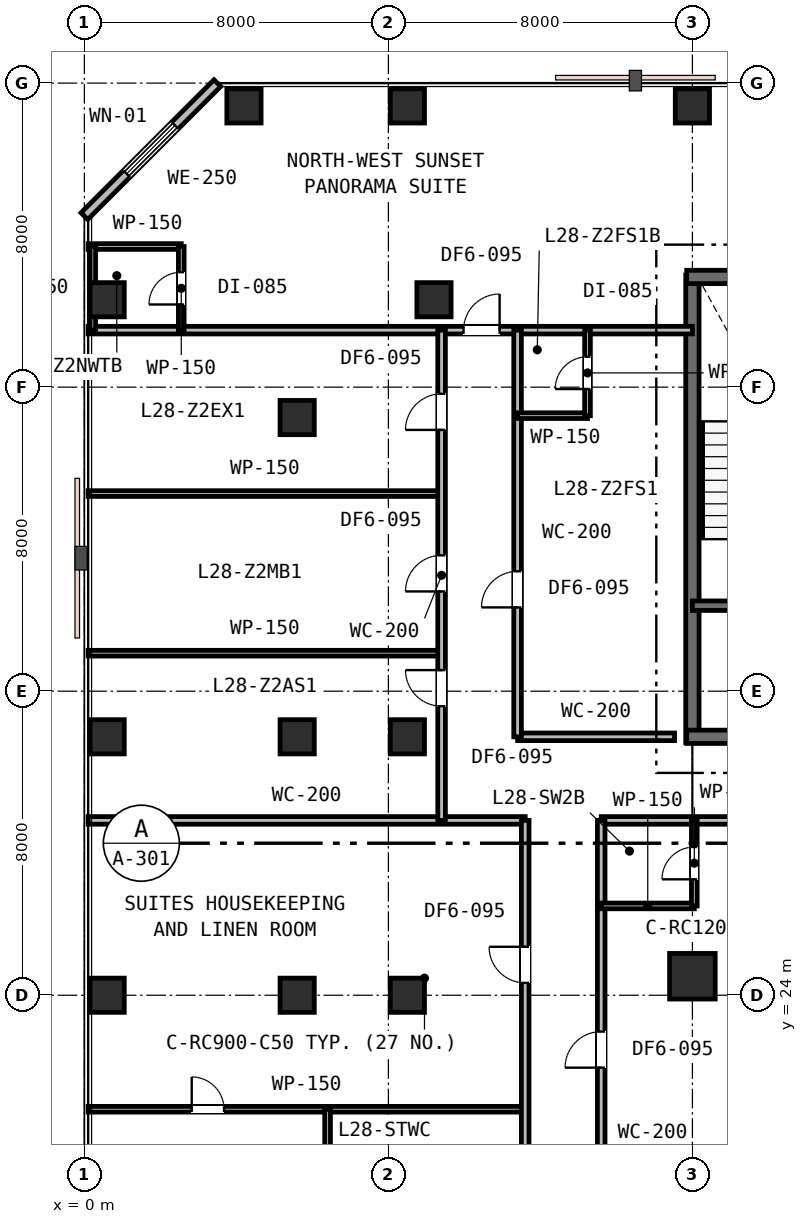
"""IFC4 building model, lengths in metres.
Left out: names, types, materials, properties, quantities, classifications, styles, units other than length and angle.
Written with IfcOpenShell. Run it as: python <this file> out.ifc"""

import sys

from ifc_helpers import new_model, si_unit, direction, frame, frame_2d, origin, origin_2d, place, context, subcontext, project, spatial, rectangle, extrude, element, fill, save


model = new_model("IFC4")
c1 = context("Model", 3, precision=1e-05, world=origin(), true_north=direction((0.0, 1.0)))
c2 = subcontext(c1, "Body", "Model", "MODEL_VIEW")
j1 = project(units=[si_unit("LENGTHUNIT", "METRE"), si_unit("PLANEANGLEUNIT", "RADIAN")], contexts=[c1])
p1 = place(None, origin())
s1 = spatial("IfcSite", under=j1, at=p1, CompositionType="ELEMENT")
p2 = place(p1, origin())
s2 = spatial("IfcBuilding", under=s1, at=p2, CompositionType="ELEMENT")
p3 = place(p2, frame((0.0, 0.0, 111.6)))
s3 = spatial("IfcBuildingStorey", under=s2, at=p3, CompositionType="ELEMENT", Elevation=111.6)
p4 = place(p3, frame((16.0, 30.65, 0.0), z_axis=(0.0, 0.0, 1.0), x_axis=(0.0, 1.0, 0.0)))
e1 = element("IfcWall", 1, at=p4, inside=s3, PredefinedType="SHEAR", context=c2, shape_type="SweptSolid", body=[
    extrude(rectangle(XDim=12.3, YDim=0.35, at=frame_2d((6.15, 0.0))), origin(), (0.0, 0.0, 1.0), 3.6),
])
p5 = place(p3, frame((15.85, 42.9, 0.0), z_axis=(0.0, 0.0, 1.0), x_axis=(1.0, 0.0, 0.0)))
e2 = element("IfcWall", 2, at=p5, inside=s3, PredefinedType="SHEAR", context=c2, shape_type="SweptSolid", body=[
    extrude(rectangle(XDim=24.3, YDim=0.35, at=frame_2d((12.15, 0.0))), origin(), (0.0, 0.0, 1.0), 3.6),
])
p6 = place(p3, frame((15.85, 30.8, 0.0), z_axis=(0.0, 0.0, 1.0), x_axis=(1.0, 0.0, 0.0)))
e3 = element("IfcWall", 3, at=p6, inside=s3, PredefinedType="SHEAR", context=c2, shape_type="SweptSolid", body=[
    extrude(rectangle(XDim=11.2, YDim=0.35, at=frame_2d((5.6, 0.0))), origin(), (0.0, 0.0, 1.0), 3.6),
])
p7 = place(p6, frame((2.45, 0.0, 0.0)))
e4 = element("IfcOpeningElement", 4, at=p7, cuts=e3, PredefinedType="OPENING", context=c2, shape_type="SweptSolid", body=[
    extrude(rectangle(XDim=1.1, YDim=2.15, at=frame_2d((0.55, 1.075))), frame((0.0, 0.185, 0.0), z_axis=(0.0, -1.0, 0.0), x_axis=(1.0, 0.0, 0.0)), (0.0, 0.0, 1.0), 0.37),
])
p8 = place(p3, frame((16.0, 34.25, 0.0), z_axis=(0.0, 0.0, 1.0), x_axis=(1.0, 0.0, 0.0)))
e5 = element("IfcWall", 5, at=p8, inside=s3, PredefinedType="SHEAR", context=c2, shape_type="SweptSolid", body=[
    extrude(rectangle(XDim=6.05, YDim=0.25, at=frame_2d((3.025, 0.0))), origin(), (0.0, 0.0, 1.0), 3.6),
])
p9 = place(p8, frame((1.25, 0.0, 0.0)))
e6 = element("IfcOpeningElement", 6, at=p9, cuts=e5, PredefinedType="OPENING", context=c2, shape_type="SweptSolid", body=[
    extrude(rectangle(XDim=1.0, YDim=2.15, at=frame_2d((0.5, 1.075))), frame((0.0, 0.135, 0.0), z_axis=(0.0, -1.0, 0.0), x_axis=(1.0, 0.0, 0.0)), (0.0, 0.0, 1.0), 0.27),
])
p10 = place(p8, frame((4.2, 0.0, 0.0)))
e7 = element("IfcOpeningElement", 7, at=p10, cuts=e5, PredefinedType="OPENING", context=c2, shape_type="SweptSolid", body=[
    extrude(rectangle(XDim=1.1, YDim=2.15, at=frame_2d((0.55, 1.075))), frame((0.0, 0.135, 0.0), z_axis=(0.0, -1.0, 0.0), x_axis=(1.0, 0.0, 0.0)), (0.0, 0.0, 1.0), 0.27),
])
p11 = place(p3, frame((8.5, 24.0, 0.0), z_axis=(0.0, 0.0, 1.0), x_axis=(1.0, 0.0, 0.0)))
e8 = element("IfcColumn", 8, at=p11, inside=s3, PredefinedType="COLUMN", context=c2, shape_type="SweptSolid", body=[
    extrude(rectangle(XDim=0.9, YDim=0.9, at=origin_2d()), origin(), (0.0, 0.0, 1.0), 3.6),
])
p12 = place(p3, frame((16.0, 24.5, 0.0), z_axis=(0.0, 0.0, 1.0), x_axis=(1.0, 0.0, 0.0)))
e9 = element("IfcColumn", 9, at=p12, inside=s3, PredefinedType="COLUMN", context=c2, shape_type="SweptSolid", body=[
    extrude(rectangle(XDim=1.2, YDim=1.2, at=origin_2d()), origin(), (0.0, 0.0, 1.0), 3.6),
])
for number, where, z_axis, x_axis in (
    (10, (5.6, 24.0, 0.0), (0.0, 0.0, 1.0), (1.0, 0.0, 0.0)),
    (11, (5.6, 30.8, 0.0), (0.0, 0.0, 1.0), (1.0, 0.0, 0.0)),
    (12, (5.6, 39.2, 0.0), (0.0, 0.0, 1.0), (1.0, 0.0, 0.0)),
    (13, (8.5, 30.8, 0.0), (0.0, 0.0, 1.0), (1.0, 0.0, 0.0)),
    (14, (9.2, 42.3, 0.0), (0.0, 0.0, 1.0), (1.0, 0.0, 0.0)),
    (15, (0.6, 24.0, 0.0), (0.0, 0.0, 1.0), (1.0, 0.0, 0.0)),
    (16, (0.6, 30.8, 0.0), (0.0, 0.0, 1.0), (1.0, 0.0, 0.0)),
    (17, (0.6, 42.3, 0.0), (0.0, 0.0, 1.0), (1.0, 0.0, 0.0)),
    (18, (4.2, 47.4, 0.0), (0.0, 0.0, 1.0), (1.0, 0.0, 0.0)),
    (19, (8.5, 47.4, 0.0), (0.0, 0.0, 1.0), (1.0, 0.0, 0.0)),
    (20, (16.0, 47.4, 0.0), (0.0, 0.0, 1.0), (1.0, 0.0, 0.0)),
):
    element("IfcColumn", number, at=place(p3, frame(where, z_axis=z_axis, x_axis=x_axis)), inside=s3, PredefinedType="COLUMN", context=c2, shape_type="SweptSolid", body=[
        extrude(rectangle(XDim=0.9, YDim=0.9, at=origin_2d()), origin(), (0.0, 0.0, 1.0), 3.6),
    ])
p13 = place(p3, frame((3.5, 48.0, 0.0), z_axis=(0.0, 0.0, 1.0), x_axis=(-0.707106781187, -0.707106781187, 0.0)))
e21 = element("IfcWall", 21, at=p13, inside=s3, PredefinedType="STANDARD", context=c2, shape_type="SweptSolid", body=[
    extrude(rectangle(XDim=4.95, YDim=0.25, at=frame_2d((2.475, 0.0))), origin(), (0.0, 0.0, 1.0), 3.33),
])
p14 = place(p13, frame((1.575, 0.0, 0.75)))
e22 = element("IfcOpeningElement", 22, at=p14, cuts=e21, PredefinedType="OPENING", context=c2, shape_type="SweptSolid", body=[
    extrude(rectangle(XDim=1.8, YDim=1.85, at=frame_2d((0.9, 0.925))), frame((0.0, 0.135, 0.0), z_axis=(0.0, -1.0, 0.0), x_axis=(1.0, 0.0, 0.0)), (0.0, 0.0, 1.0), 0.27),
])
p15 = place(p3, frame((0.1, 28.6, 0.0), z_axis=(0.0, 0.0, 1.0), x_axis=(1.0, 0.0, 0.0)))
e23 = element("IfcWall", 23, at=p15, inside=s3, PredefinedType="PARTITIONING", context=c2, shape_type="SweptSolid", body=[
    extrude(rectangle(XDim=11.5, YDim=0.2, at=frame_2d((5.75, 0.0))), origin(), (0.0, 0.0, 1.0), 2.87),
])
p16 = place(p3, frame((13.6, 28.6, 0.0), z_axis=(0.0, 0.0, 1.0), x_axis=(1.0, 0.0, 0.0)))
e24 = element("IfcWall", 24, at=p16, inside=s3, PredefinedType="PARTITIONING", context=c2, shape_type="SweptSolid", body=[
    extrude(rectangle(XDim=30.6, YDim=0.2, at=frame_2d((15.3, 0.0))), origin(), (0.0, 0.0, 1.0), 2.87),
])
p17 = place(p16, frame((13.325, 0.0, 0.0)))
e25 = element("IfcOpeningElement", 25, at=p17, cuts=e24, PredefinedType="OPENING", context=c2, shape_type="SweptSolid", body=[
    extrude(rectangle(XDim=0.95, YDim=2.15, at=frame_2d((0.475, 1.075))), frame((0.0, 0.11, 0.0), z_axis=(0.0, -1.0, 0.0), x_axis=(1.0, 0.0, 0.0)), (0.0, 0.0, 1.0), 0.22),
])
p18 = place(p16, frame((18.761, 0.0, 0.0)))
e26 = element("IfcOpeningElement", 26, at=p18, cuts=e24, PredefinedType="OPENING", context=c2, shape_type="SweptSolid", body=[
    extrude(rectangle(XDim=0.95, YDim=2.15, at=frame_2d((0.475, 1.075))), frame((0.0, 0.11, 0.0), z_axis=(0.0, -1.0, 0.0), x_axis=(1.0, 0.0, 0.0)), (0.0, 0.0, 1.0), 0.22),
])
p19 = place(p16, frame((25.503, 0.0, 0.0)))
e27 = element("IfcOpeningElement", 27, at=p19, cuts=e24, PredefinedType="OPENING", context=c2, shape_type="SweptSolid", body=[
    extrude(rectangle(XDim=0.95, YDim=2.15, at=frame_2d((0.475, 1.075))), frame((0.0, 0.11, 0.0), z_axis=(0.0, -1.0, 0.0), x_axis=(1.0, 0.0, 0.0)), (0.0, 0.0, 1.0), 0.22),
])
p20 = place(p3, frame((11.4, 30.8, 0.0), z_axis=(0.0, 0.0, 1.0), x_axis=(1.0, 0.0, 0.0)))
e28 = element("IfcWall", 28, at=p20, inside=s3, PredefinedType="PARTITIONING", context=c2, shape_type="SweptSolid", body=[
    extrude(rectangle(XDim=4.13, YDim=0.2, at=frame_2d((2.065, 0.0))), origin(), (0.0, 0.0, 1.0), 2.87),
])
p21 = place(p3, frame((0.1, 21.0, 0.0), z_axis=(0.0, 0.0, 1.0), x_axis=(1.0, 0.0, 0.0)))
e29 = element("IfcWall", 29, at=p21, inside=s3, PredefinedType="PARTITIONING", context=c2, shape_type="SweptSolid", body=[
    extrude(rectangle(XDim=11.5, YDim=0.15, at=frame_2d((5.75, 0.0))), origin(), (0.0, 0.0, 1.0), 2.87),
])
p22 = place(p21, frame((2.725, 0.0, 0.0)))
e30 = element("IfcOpeningElement", 30, at=p22, cuts=e29, PredefinedType="OPENING", context=c2, shape_type="SweptSolid", body=[
    extrude(rectangle(XDim=0.85, YDim=2.15, at=frame_2d((0.425, 1.075))), frame((0.0, 0.085, 0.0), z_axis=(0.0, -1.0, 0.0), x_axis=(1.0, 0.0, 0.0)), (0.0, 0.0, 1.0), 0.17),
])
p23 = place(p3, frame((6.4, 18.0, 0.0), z_axis=(0.0, 0.0, 1.0), x_axis=(0.0, 1.0, 0.0)))
e31 = element("IfcWall", 31, at=p23, inside=s3, PredefinedType="PARTITIONING", context=c2, shape_type="SweptSolid", body=[
    extrude(rectangle(XDim=3.0, YDim=0.15, at=frame_2d((1.5, 0.0))), origin(), (0.0, 0.0, 1.0), 2.87),
])
p24 = place(p3, frame((11.6, 10.6, 0.0), z_axis=(0.0, 0.0, 1.0), x_axis=(0.0, 1.0, 0.0)))
e32 = element("IfcWall", 32, at=p24, inside=s3, PredefinedType="PARTITIONING", context=c2, shape_type="SweptSolid", body=[
    extrude(rectangle(XDim=18.0, YDim=0.2, at=frame_2d((9.0, 0.0))), origin(), (0.0, 0.0, 1.0), 2.87),
])
p25 = place(p24, frame((8.425, 0.0, 0.0)))
e33 = element("IfcOpeningElement", 33, at=p25, cuts=e32, PredefinedType="OPENING", context=c2, shape_type="SweptSolid", body=[
    extrude(rectangle(XDim=0.95, YDim=2.15, at=frame_2d((0.475, 1.075))), frame((0.0, 0.11, 0.0), z_axis=(0.0, -1.0, 0.0), x_axis=(1.0, 0.0, 0.0)), (0.0, 0.0, 1.0), 0.22),
])
p26 = place(p24, frame((13.725, 0.0, 0.0)))
e34 = element("IfcOpeningElement", 34, at=p26, cuts=e32, PredefinedType="OPENING", context=c2, shape_type="SweptSolid", body=[
    extrude(rectangle(XDim=0.95, YDim=2.15, at=frame_2d((0.475, 1.075))), frame((0.0, 0.11, 0.0), z_axis=(0.0, -1.0, 0.0), x_axis=(1.0, 0.0, 0.0)), (0.0, 0.0, 1.0), 0.22),
])
p27 = place(p24, frame((3.225, 0.0, 0.0)))
e35 = element("IfcOpeningElement", 35, at=p27, cuts=e32, PredefinedType="OPENING", context=c2, shape_type="SweptSolid", body=[
    extrude(rectangle(XDim=0.95, YDim=2.15, at=frame_2d((0.475, 1.075))), frame((0.0, 0.11, 0.0), z_axis=(0.0, -1.0, 0.0), x_axis=(1.0, 0.0, 0.0)), (0.0, 0.0, 1.0), 0.22),
])
p28 = place(p3, frame((0.1, 41.5, 0.0), z_axis=(0.0, 0.0, 1.0), x_axis=(1.0, 0.0, 0.0)))
e36 = element("IfcWall", 36, at=p28, inside=s3, PredefinedType="PARTITIONING", context=c2, shape_type="SweptSolid", body=[
    extrude(rectangle(XDim=15.9, YDim=0.2, at=frame_2d((7.95, 0.0))), origin(), (0.0, 0.0, 1.0), 2.87),
])
p29 = place(p28, frame((9.877, 0.0, 0.0)))
e37 = element("IfcOpeningElement", 37, at=p29, cuts=e36, PredefinedType="OPENING", context=c2, shape_type="SweptSolid", body=[
    extrude(rectangle(XDim=0.95, YDim=2.15, at=frame_2d((0.475, 1.075))), frame((0.0, 0.11, 0.0), z_axis=(0.0, -1.0, 0.0), x_axis=(1.0, 0.0, 0.0)), (0.0, 0.0, 1.0), 0.22),
])
p30 = place(p3, frame((0.1, 43.7, 0.0), z_axis=(0.0, 0.0, 1.0), x_axis=(1.0, 0.0, 0.0)))
e38 = element("IfcWall", 38, at=p30, inside=s3, PredefinedType="PARTITIONING", context=c2, shape_type="SweptSolid", body=[
    extrude(rectangle(XDim=2.45, YDim=0.15, at=frame_2d((1.225, 0.0))), origin(), (0.0, 0.0, 1.0), 3.33),
])
p31 = place(p3, frame((2.55, 41.5, 0.0), z_axis=(0.0, 0.0, 1.0), x_axis=(0.0, 1.0, 0.0)))
e39 = element("IfcWall", 39, at=p31, inside=s3, PredefinedType="PARTITIONING", context=c2, shape_type="SweptSolid", body=[
    extrude(rectangle(XDim=2.2, YDim=0.15, at=frame_2d((1.1, 0.0))), origin(), (0.0, 0.0, 1.0), 2.87),
])
p32 = place(p31, frame((0.675, 0.0, 0.0)))
e40 = element("IfcOpeningElement", 40, at=p32, cuts=e39, PredefinedType="OPENING", context=c2, shape_type="SweptSolid", body=[
    extrude(rectangle(XDim=0.85, YDim=2.15, at=frame_2d((0.425, 1.075))), frame((0.0, 0.085, 0.0), z_axis=(0.0, -1.0, 0.0), x_axis=(1.0, 0.0, 0.0)), (0.0, 0.0, 1.0), 0.17),
])
p33 = place(p3, frame((0.22, 41.5, 0.0), z_axis=(0.0, 0.0, 1.0), x_axis=(0.0, 1.0, 0.0)))
e41 = element("IfcWall", 41, at=p33, inside=s3, PredefinedType="PARTITIONING", context=c2, shape_type="SweptSolid", body=[
    extrude(rectangle(XDim=2.2, YDim=0.15, at=frame_2d((1.1, 0.0))), origin(), (0.0, 0.0, 1.0), 2.87),
])
for number, where, z_axis, x_axis in (
    (42, (0.1, 33.0, 0.0), (0.0, 0.0, 1.0), (1.0, 0.0, 0.0)),
    (43, (0.1, 37.2, 0.0), (0.0, 0.0, 1.0), (1.0, 0.0, 0.0)),
):
    element("IfcWall", number, at=place(p3, frame(where, z_axis=z_axis, x_axis=x_axis)), inside=s3, PredefinedType="PARTITIONING", context=c2, shape_type="SweptSolid", body=[
        extrude(rectangle(XDim=9.3, YDim=0.15, at=frame_2d((4.65, 0.0))), origin(), (0.0, 0.0, 1.0), 2.87),
    ])
p34 = place(p3, frame((9.4, 28.6, 0.0), z_axis=(0.0, 0.0, 1.0), x_axis=(0.0, 1.0, 0.0)))
e44 = element("IfcWall", 44, at=p34, inside=s3, PredefinedType="PARTITIONING", context=c2, shape_type="SweptSolid", body=[
    extrude(rectangle(XDim=12.9, YDim=0.2, at=frame_2d((6.45, 0.0))), origin(), (0.0, 0.0, 1.0), 2.87),
])
p35 = place(p34, frame((3.005, 0.0, 0.0)))
e45 = element("IfcOpeningElement", 45, at=p35, cuts=e44, PredefinedType="OPENING", context=c2, shape_type="SweptSolid", body=[
    extrude(rectangle(XDim=0.95, YDim=2.15, at=frame_2d((0.475, 1.075))), frame((0.0, 0.11, 0.0), z_axis=(0.0, -1.0, 0.0), x_axis=(1.0, 0.0, 0.0)), (0.0, 0.0, 1.0), 0.22),
])
p36 = place(p34, frame((6.025, 0.0, 0.0)))
e46 = element("IfcOpeningElement", 46, at=p36, cuts=e44, PredefinedType="OPENING", context=c2, shape_type="SweptSolid", body=[
    extrude(rectangle(XDim=0.95, YDim=2.15, at=frame_2d((0.475, 1.075))), frame((0.0, 0.11, 0.0), z_axis=(0.0, -1.0, 0.0), x_axis=(1.0, 0.0, 0.0)), (0.0, 0.0, 1.0), 0.22),
])
p37 = place(p34, frame((10.275, 0.0, 0.0)))
e47 = element("IfcOpeningElement", 47, at=p37, cuts=e44, PredefinedType="OPENING", context=c2, shape_type="SweptSolid", body=[
    extrude(rectangle(XDim=0.95, YDim=2.15, at=frame_2d((0.475, 1.075))), frame((0.0, 0.11, 0.0), z_axis=(0.0, -1.0, 0.0), x_axis=(1.0, 0.0, 0.0)), (0.0, 0.0, 1.0), 0.22),
])
p38 = place(p3, frame((11.4, 30.8, 0.0), z_axis=(0.0, 0.0, 1.0), x_axis=(0.0, 1.0, 0.0)))
e48 = element("IfcWall", 48, at=p38, inside=s3, PredefinedType="PARTITIONING", context=c2, shape_type="SweptSolid", body=[
    extrude(rectangle(XDim=10.7, YDim=0.2, at=frame_2d((5.35, 0.0))), origin(), (0.0, 0.0, 1.0), 2.87),
])
p39 = place(p38, frame((3.405, 0.0, 0.0)))
e49 = element("IfcOpeningElement", 49, at=p39, cuts=e48, PredefinedType="OPENING", context=c2, shape_type="SweptSolid", body=[
    extrude(rectangle(XDim=0.95, YDim=2.15, at=frame_2d((0.475, 1.075))), frame((0.0, 0.11, 0.0), z_axis=(0.0, -1.0, 0.0), x_axis=(1.0, 0.0, 0.0)), (0.0, 0.0, 1.0), 0.22),
])
p40 = place(p3, frame((11.4, 39.25, 0.0), z_axis=(0.0, 0.0, 1.0), x_axis=(1.0, 0.0, 0.0)))
e50 = element("IfcWall", 50, at=p40, inside=s3, PredefinedType="PARTITIONING", context=c2, shape_type="SweptSolid", body=[
    extrude(rectangle(XDim=1.84, YDim=0.15, at=frame_2d((0.92, 0.0))), origin(), (0.0, 0.0, 1.0), 3.33),
])
p41 = place(p3, frame((13.24, 39.25, 0.0), z_axis=(0.0, 0.0, 1.0), x_axis=(0.0, 1.0, 0.0)))
e51 = element("IfcWall", 51, at=p41, inside=s3, PredefinedType="PARTITIONING", context=c2, shape_type="SweptSolid", body=[
    extrude(rectangle(XDim=2.25, YDim=0.15, at=frame_2d((1.125, 0.0))), origin(), (0.0, 0.0, 1.0), 3.33),
])
p42 = place(p41, frame((0.7, 0.0, 0.0)))
e52 = element("IfcOpeningElement", 52, at=p42, cuts=e51, PredefinedType="OPENING", context=c2, shape_type="SweptSolid", body=[
    extrude(rectangle(XDim=0.85, YDim=2.15, at=frame_2d((0.425, 1.075))), frame((0.0, 0.085, 0.0), z_axis=(0.0, -1.0, 0.0), x_axis=(1.0, 0.0, 0.0)), (0.0, 0.0, 1.0), 0.17),
])
p43 = place(p3, frame((13.6, 10.6, 0.0), z_axis=(0.0, 0.0, 1.0), x_axis=(0.0, 1.0, 0.0)))
e53 = element("IfcWall", 53, at=p43, inside=s3, PredefinedType="PARTITIONING", context=c2, shape_type="SweptSolid", body=[
    extrude(rectangle(XDim=18.0, YDim=0.2, at=frame_2d((9.0, 0.0))), origin(), (0.0, 0.0, 1.0), 2.87),
])
p44 = place(p43, frame((4.24, 0.0, 0.0)))
e54 = element("IfcOpeningElement", 54, at=p44, cuts=e53, PredefinedType="OPENING", context=c2, shape_type="SweptSolid", body=[
    extrude(rectangle(XDim=0.95, YDim=2.15, at=frame_2d((0.475, 1.075))), frame((0.0, 0.11, 0.0), z_axis=(0.0, -1.0, 0.0), x_axis=(1.0, 0.0, 0.0)), (0.0, 0.0, 1.0), 0.22),
])
p45 = place(p43, frame((11.494, 0.0, 0.0)))
e55 = element("IfcOpeningElement", 55, at=p45, cuts=e53, PredefinedType="OPENING", context=c2, shape_type="SweptSolid", body=[
    extrude(rectangle(XDim=0.95, YDim=2.15, at=frame_2d((0.475, 1.075))), frame((0.0, 0.11, 0.0), z_axis=(0.0, -1.0, 0.0), x_axis=(1.0, 0.0, 0.0)), (0.0, 0.0, 1.0), 0.22),
])
p46 = place(p3, frame((13.6, 26.35, 0.0), z_axis=(0.0, 0.0, 1.0), x_axis=(1.0, 0.0, 0.0)))
e56 = element("IfcWall", 56, at=p46, inside=s3, PredefinedType="PARTITIONING", context=c2, shape_type="SweptSolid", body=[
    extrude(rectangle(XDim=2.45, YDim=0.15, at=frame_2d((1.225, 0.0))), origin(), (0.0, 0.0, 1.0), 2.87),
])
p47 = place(p3, frame((16.05, 26.35, 0.0), z_axis=(0.0, 0.0, 1.0), x_axis=(0.0, 1.0, 0.0)))
e57 = element("IfcWall", 57, at=p47, inside=s3, PredefinedType="PARTITIONING", context=c2, shape_type="SweptSolid", body=[
    extrude(rectangle(XDim=2.25, YDim=0.15, at=frame_2d((1.125, 0.0))), origin(), (0.0, 0.0, 1.0), 2.87),
])
p48 = place(p47, frame((0.7, 0.0, 0.0)))
e58 = element("IfcOpeningElement", 58, at=p48, cuts=e57, PredefinedType="OPENING", context=c2, shape_type="SweptSolid", body=[
    extrude(rectangle(XDim=0.85, YDim=2.15, at=frame_2d((0.425, 1.075))), frame((0.0, 0.085, 0.0), z_axis=(0.0, -1.0, 0.0), x_axis=(1.0, 0.0, 0.0)), (0.0, 0.0, 1.0), 0.17),
])
p49 = place(p14, origin())
e59 = element("IfcWindow", 59, at=p49, inside=s3, PartitioningType="SINGLE_PANEL", PredefinedType="WINDOW", context=c2, shape_type="SweptSolid", body=[
    extrude(rectangle(XDim=1.8, YDim=1.85, at=frame_2d((0.9, 0.925))), frame((0.0, 0.03, 0.0), z_axis=(0.0, -1.0, 0.0), x_axis=(1.0, 0.0, 0.0)), (0.0, 0.0, 1.0), 0.06),
])
fill(e22, e59)
p50 = place(p22, origin())
e60 = element("IfcDoor", 60, at=p50, inside=s3, OperationType="SINGLE_SWING_LEFT", PredefinedType="DOOR", context=c2, shape_type="SweptSolid", body=[
    extrude(rectangle(XDim=0.85, YDim=2.15, at=frame_2d((0.425, 1.075))), frame((0.0, 0.025, 0.0), z_axis=(0.0, -1.0, 0.0), x_axis=(1.0, 0.0, 0.0)), (0.0, 0.0, 1.0), 0.05),
])
fill(e30, e60)
p51 = place(p26, origin())
e61 = element("IfcDoor", 61, at=p51, inside=s3, OperationType="SINGLE_SWING_RIGHT", PredefinedType="DOOR", context=c2, shape_type="SweptSolid", body=[
    extrude(rectangle(XDim=0.95, YDim=2.15, at=frame_2d((0.475, 1.075))), frame((0.0, 0.025, 0.0), z_axis=(0.0, -1.0, 0.0), x_axis=(1.0, 0.0, 0.0)), (0.0, 0.0, 1.0), 0.05),
])
fill(e34, e61)
p52 = place(p29, origin())
e62 = element("IfcDoor", 62, at=p52, inside=s3, OperationType="SINGLE_SWING_RIGHT", PredefinedType="DOOR", context=c2, shape_type="SweptSolid", body=[
    extrude(rectangle(XDim=0.95, YDim=2.15, at=frame_2d((0.475, 1.075))), frame((0.0, 0.025, 0.0), z_axis=(0.0, -1.0, 0.0), x_axis=(1.0, 0.0, 0.0)), (0.0, 0.0, 1.0), 0.05),
])
fill(e37, e62)
p53 = place(p32, origin())
e63 = element("IfcDoor", 63, at=p53, inside=s3, OperationType="SINGLE_SWING_LEFT", PredefinedType="DOOR", context=c2, shape_type="SweptSolid", body=[
    extrude(rectangle(XDim=0.85, YDim=2.15, at=frame_2d((0.425, 1.075))), frame((0.0, 0.025, 0.0), z_axis=(0.0, -1.0, 0.0), x_axis=(1.0, 0.0, 0.0)), (0.0, 0.0, 1.0), 0.05),
])
fill(e40, e63)
p54 = place(p35, origin())
e64 = element("IfcDoor", 64, at=p54, inside=s3, OperationType="SINGLE_SWING_RIGHT", PredefinedType="DOOR", context=c2, shape_type="SweptSolid", body=[
    extrude(rectangle(XDim=0.95, YDim=2.15, at=frame_2d((0.475, 1.075))), frame((0.0, 0.025, 0.0), z_axis=(0.0, -1.0, 0.0), x_axis=(1.0, 0.0, 0.0)), (0.0, 0.0, 1.0), 0.05),
])
fill(e45, e64)
p55 = place(p36, origin())
e65 = element("IfcDoor", 65, at=p55, inside=s3, OperationType="SINGLE_SWING_LEFT", PredefinedType="DOOR", context=c2, shape_type="SweptSolid", body=[
    extrude(rectangle(XDim=0.95, YDim=2.15, at=frame_2d((0.475, 1.075))), frame((0.0, 0.025, 0.0), z_axis=(0.0, -1.0, 0.0), x_axis=(1.0, 0.0, 0.0)), (0.0, 0.0, 1.0), 0.05),
])
fill(e46, e65)
p56 = place(p37, origin())
e66 = element("IfcDoor", 66, at=p56, inside=s3, OperationType="SINGLE_SWING_LEFT", PredefinedType="DOOR", context=c2, shape_type="SweptSolid", body=[
    extrude(rectangle(XDim=0.95, YDim=2.15, at=frame_2d((0.475, 1.075))), frame((0.0, 0.025, 0.0), z_axis=(0.0, -1.0, 0.0), x_axis=(1.0, 0.0, 0.0)), (0.0, 0.0, 1.0), 0.05),
])
fill(e47, e66)
p57 = place(p39, origin())
e67 = element("IfcDoor", 67, at=p57, inside=s3, OperationType="SINGLE_SWING_LEFT", PredefinedType="DOOR", context=c2, shape_type="SweptSolid", body=[
    extrude(rectangle(XDim=0.95, YDim=2.15, at=frame_2d((0.475, 1.075))), frame((0.0, 0.025, 0.0), z_axis=(0.0, -1.0, 0.0), x_axis=(1.0, 0.0, 0.0)), (0.0, 0.0, 1.0), 0.05),
])
fill(e49, e67)
p58 = place(p42, origin())
e68 = element("IfcDoor", 68, at=p58, inside=s3, OperationType="SINGLE_SWING_LEFT", PredefinedType="DOOR", context=c2, shape_type="SweptSolid", body=[
    extrude(rectangle(XDim=0.85, YDim=2.15, at=frame_2d((0.425, 1.075))), frame((0.0, 0.025, 0.0), z_axis=(0.0, -1.0, 0.0), x_axis=(1.0, 0.0, 0.0)), (0.0, 0.0, 1.0), 0.05),
])
fill(e52, e68)
p59 = place(p45, origin())
e69 = element("IfcDoor", 69, at=p59, inside=s3, OperationType="SINGLE_SWING_LEFT", PredefinedType="DOOR", context=c2, shape_type="SweptSolid", body=[
    extrude(rectangle(XDim=0.95, YDim=2.15, at=frame_2d((0.475, 1.075))), frame((0.0, 0.025, 0.0), z_axis=(0.0, -1.0, 0.0), x_axis=(1.0, 0.0, 0.0)), (0.0, 0.0, 1.0), 0.05),
])
fill(e55, e69)
p60 = place(p48, origin())
e70 = element("IfcDoor", 70, at=p60, inside=s3, OperationType="SINGLE_SWING_LEFT", PredefinedType="DOOR", context=c2, shape_type="SweptSolid", body=[
    extrude(rectangle(XDim=0.85, YDim=2.15, at=frame_2d((0.425, 1.075))), frame((0.0, 0.025, 0.0), z_axis=(0.0, -1.0, 0.0), x_axis=(1.0, 0.0, 0.0)), (0.0, 0.0, 1.0), 0.05),
])
fill(e58, e70)
save(model, sys.argv[1])
